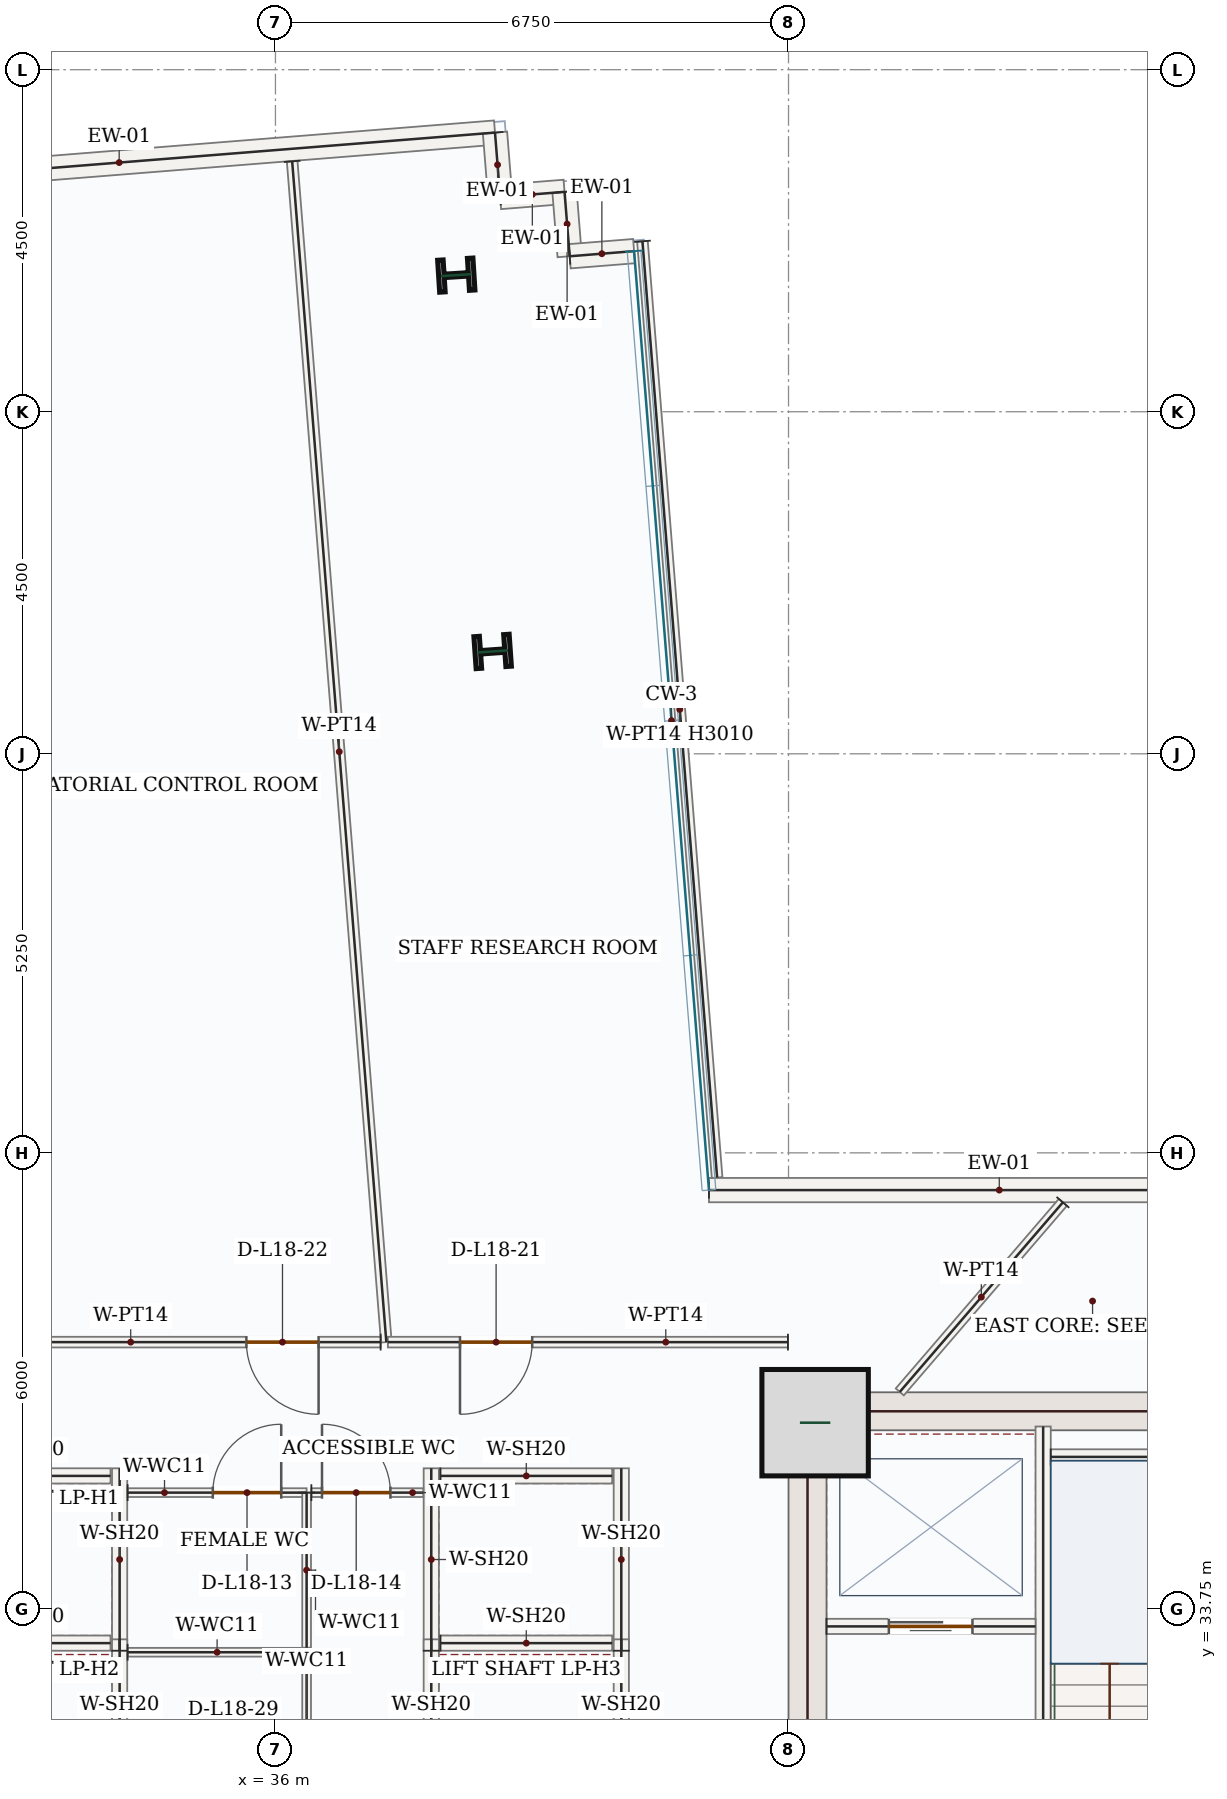
"""IFC4 building model, lengths in metres.
Left out: names, types, materials, properties, quantities, classifications, styles, units other than length and angle.
Written with IfcOpenShell. Run it as: python <this file> out.ifc"""

import sys

from ifc_helpers import new_model, si_unit, direction, frame, frame_2d, origin, origin_2d, place, context, subcontext, project, spatial, rectangle, i_section, extrude, source, transform, mapped, element, fill, save


model = new_model("IFC4")
c1 = context("Model", 3, precision=1e-05, world=origin(), true_north=direction((0.0, 1.0)))
c2 = subcontext(c1, "Body", "Model", "MODEL_VIEW")
j1 = project(units=[si_unit("LENGTHUNIT", "METRE"), si_unit("PLANEANGLEUNIT", "RADIAN")], contexts=[c1])
p1 = place(None, origin())
s1 = spatial("IfcSite", under=j1, at=p1, CompositionType="ELEMENT")
p2 = place(p1, origin())
s2 = spatial("IfcBuilding", under=s1, at=p2, CompositionType="ELEMENT")
p3 = place(p2, frame((0.0, 0.0, 83.7)))
s3 = spatial("IfcBuildingStorey", under=s2, at=p3, CompositionType="ELEMENT", Elevation=83.7)
p4 = place(p3, frame((43.0, 28.05, 0.0), z_axis=(0.0, 0.0, 1.0), x_axis=(0.0, 1.0, 0.0)))
e1 = element("IfcWall", 1, at=p4, inside=s3, PredefinedType="SHEAR", context=c2, shape_type="SweptSolid", body=[
    extrude(rectangle(XDim=8.55, YDim=0.5, at=frame_2d((4.275, 0.0))), origin(), (0.0, 0.0, 1.0), 3.95),
])
p5 = place(p4, frame((1.5, 0.0, 0.0)))
e2 = element("IfcOpeningElement", 2, at=p5, cuts=e1, PredefinedType="OPENING", context=c2, shape_type="SweptSolid", body=[
    extrude(rectangle(XDim=1.1, YDim=2.2, at=frame_2d((0.55, 1.1))), frame((0.0, 0.26, 0.0), z_axis=(0.0, -1.0, 0.0), x_axis=(1.0, 0.0, 0.0)), (0.0, 0.0, 1.0), 0.52),
])
m1 = source(origin(), c2, "Body", "SweptSolid", [
    extrude(rectangle(XDim=7.0, YDim=0.5, at=frame_2d((3.5, 0.0))), origin(), (0.0, 0.0, 1.0), 3.95),
])
p6 = place(p3, frame((43.25, 36.35, 0.0), z_axis=(0.0, 0.0, 1.0), x_axis=(1.0, 0.0, 0.0)))
e3 = element("IfcWall", 3, at=p6, inside=s3, PredefinedType="SHEAR", context=c2, shape_type="MappedRepresentation", body=[
    mapped(m1, transform((0.0, 0.0, 0.0), x_axis=(1.0, 0.0, 0.0), y_axis=(0.0, 1.0, 0.0), z_axis=(0.0, 0.0, 1.0), scale=1.0)),
])
m2 = source(origin(), c2, "Body", "SweptSolid", [
    extrude(rectangle(XDim=1.4, YDim=1.4, at=origin_2d()), origin(), (0.0, 0.0, 1.0), 4.2),
])
p7 = place(p3, frame((43.1, 36.2, 0.0), z_axis=(0.0, 0.0, 1.0), x_axis=(1.0, 0.0, 0.0)))
e4 = element("IfcColumn", 4, at=p7, inside=s3, PredefinedType="COLUMN", context=c2, shape_type="MappedRepresentation", body=[
    mapped(m2, transform((0.0, 0.0, 0.0), x_axis=(1.0, 0.0, 0.0), y_axis=(0.0, 1.0, 0.0), z_axis=(0.0, 0.0, 1.0), scale=1.0)),
])
m3 = source(origin(), c2, "Body", "SweptSolid", [
    extrude(i_section(OverallWidth=0.421, OverallDepth=0.465, WebThickness=0.045, FlangeThickness=0.073, FilletRadius=0.018, at=origin_2d()), origin(), (0.0, 0.0, 1.0), 4.2),
])
for number, where, z_axis, x_axis in (
    (5, (38.857, 46.346, 0.0), (0.0, 0.0, 1.0), (-0.07, 0.998, 0.0)),
    (6, (38.379, 51.297, 0.0), (0.0, 0.0, 1.0), (-0.063, 0.998, 0.0)),
):
    element("IfcColumn", number, at=place(p3, frame(where, z_axis=z_axis, x_axis=x_axis)), inside=s3, PredefinedType="COLUMN", context=c2, shape_type="MappedRepresentation", body=[
        mapped(m3, transform((0.0, 0.0, 0.0), x_axis=(1.0, 0.0, 0.0), y_axis=(0.0, 1.0, 0.0), z_axis=(0.0, 0.0, 1.0), scale=1.0)),
    ])
m4 = source(origin(), c2, "Body", "SweptSolid", [
    extrude(rectangle(XDim=9.92, YDim=0.32, at=frame_2d((4.96, 0.0))), origin(), (0.0, 0.0, 1.0), 3.95),
])
p8 = place(p3, frame((29.0, 52.384, 0.0), z_axis=(0.0, 0.0, 1.0), x_axis=(0.996833485558, 0.079517306731, 0.0)))
e7 = element("IfcWall", 7, at=p8, inside=s3, PredefinedType="SOLIDWALL", context=c2, shape_type="MappedRepresentation", body=[
    mapped(m4, transform((0.0, 0.0, 0.0), x_axis=(1.0, 0.0, 0.0), y_axis=(0.0, 1.0, 0.0), z_axis=(0.0, 0.0, 1.0), scale=1.0)),
])
m5 = source(origin(), c2, "Body", "SweptSolid", [
    extrude(rectangle(XDim=0.85, YDim=0.32, at=frame_2d((0.425, 0.0))), origin(), (0.0, 0.0, 1.0), 3.95),
])
p9 = place(p3, frame((38.888, 53.173, 0.0), z_axis=(0.0, 0.0, 1.0), x_axis=(0.079551174585, -0.996830783344, 0.0)))
e8 = element("IfcWall", 8, at=p9, inside=s3, PredefinedType="SOLIDWALL", context=c2, shape_type="MappedRepresentation", body=[
    mapped(m5, transform((0.0, 0.0, 0.0), x_axis=(1.0, 0.0, 0.0), y_axis=(0.0, 1.0, 0.0), z_axis=(0.0, 0.0, 1.0), scale=1.0)),
])
m6 = source(origin(), c2, "Body", "SweptSolid", [
    extrude(rectangle(XDim=0.85, YDim=0.32, at=frame_2d((0.425, 0.0))), origin(), (0.0, 0.0, 1.0), 3.95),
])
for number, where, z_axis, x_axis in (
    (9, (38.956, 52.325, 0.0), (0.0, 0.0, 1.0), (0.997, 0.079, 0.0)),
    (10, (39.803, 52.393, 0.0), (0.0, 0.0, 1.0), (0.08, -0.997, 0.0)),
):
    element("IfcWall", number, at=place(p3, frame(where, z_axis=z_axis, x_axis=x_axis)), inside=s3, PredefinedType="SOLIDWALL", context=c2, shape_type="MappedRepresentation", body=[
        mapped(m6, transform((0.0, 0.0, 0.0), x_axis=(1.0, 0.0, 0.0), y_axis=(0.0, 1.0, 0.0), z_axis=(0.0, 0.0, 1.0), scale=1.0)),
    ])
p10 = place(p3, frame((39.871, 51.545, 0.0), z_axis=(0.0, 0.0, 1.0), x_axis=(0.996830783344, 0.079551174585, 0.0)))
e11 = element("IfcWall", 11, at=p10, inside=s3, PredefinedType="SOLIDWALL", context=c2, shape_type="MappedRepresentation", body=[
    mapped(m5, transform((0.0, 0.0, 0.0), x_axis=(1.0, 0.0, 0.0), y_axis=(0.0, 1.0, 0.0), z_axis=(0.0, 0.0, 1.0), scale=1.0)),
])
m7 = source(origin(), c2, "Body", "SweptSolid", [
    extrude(rectangle(XDim=7.639, YDim=0.32, at=frame_2d((3.819, 0.0))), origin(), (0.0, 0.0, 1.0), 3.95),
])
p11 = place(p3, frame((41.703, 39.26, 0.0), z_axis=(0.0, 0.0, 1.0), x_axis=(1.0, 0.0, 0.0)))
e12 = element("IfcWall", 12, at=p11, inside=s3, PredefinedType="SOLIDWALL", context=c2, shape_type="MappedRepresentation", body=[
    mapped(m7, transform((0.0, 0.0, 0.0), x_axis=(1.0, 0.0, 0.0), y_axis=(0.0, 1.0, 0.0), z_axis=(0.0, 0.0, 1.0), scale=1.0)),
])
p12 = place(p3, frame((46.1, 28.15, 0.0), z_axis=(0.0, 0.0, 1.0), x_axis=(0.0, 1.0, 0.0)))
e13 = element("IfcWall", 13, at=p12, inside=s3, PredefinedType="SOLIDWALL", context=c2, shape_type="SweptSolid", body=[
    extrude(rectangle(XDim=8.0, YDim=0.2, at=frame_2d((4.0, 0.0))), origin(), (0.0, 0.0, 1.0), 3.95),
])
p13 = place(p12, frame((0.4, 0.0, 0.0)))
e14 = element("IfcOpeningElement", 14, at=p13, cuts=e13, PredefinedType="OPENING", context=c2, shape_type="SweptSolid", body=[
    extrude(rectangle(XDim=1.05, YDim=2.15, at=frame_2d((0.525, 1.075))), frame((0.0, 0.11, 0.0), z_axis=(0.0, -1.0, 0.0), x_axis=(1.0, 0.0, 0.0)), (0.0, 0.0, 1.0), 0.22),
])
m8 = source(origin(), c2, "Body", "SweptSolid", [
    extrude(rectangle(XDim=3.25, YDim=0.2, at=frame_2d((1.625, 0.0))), origin(), (0.0, 0.0, 1.0), 3.95),
])
p14 = place(p3, frame((46.2, 35.75, 0.0), z_axis=(0.0, 0.0, 1.0), x_axis=(1.0, 0.0, 0.0)))
e15 = element("IfcWall", 15, at=p14, inside=s3, PredefinedType="SOLIDWALL", context=c2, shape_type="MappedRepresentation", body=[
    mapped(m8, transform((0.0, 0.0, 0.0), x_axis=(1.0, 0.0, 0.0), y_axis=(0.0, 1.0, 0.0), z_axis=(0.0, 0.0, 1.0), scale=1.0)),
])
p15 = place(p3, frame((43.25, 33.52, 0.0), z_axis=(0.0, 0.0, 1.0), x_axis=(1.0, 0.0, 0.0)))
e16 = element("IfcWall", 16, at=p15, inside=s3, PredefinedType="SOLIDWALL", context=c2, shape_type="SweptSolid", body=[
    extrude(rectangle(XDim=2.75, YDim=0.2, at=frame_2d((1.375, 0.0))), origin(), (0.0, 0.0, 1.0), 3.95),
])
p16 = place(p15, frame((0.82, 0.0, 0.0)))
e17 = element("IfcOpeningElement", 17, at=p16, cuts=e16, PredefinedType="OPENING", context=c2, shape_type="SweptSolid", body=[
    extrude(rectangle(XDim=1.1, YDim=2.15, at=frame_2d((0.55, 1.075))), frame((0.0, 0.11, 0.0), z_axis=(0.0, -1.0, 0.0), x_axis=(1.0, 0.0, 0.0)), (0.0, 0.0, 1.0), 0.22),
])
m9 = source(origin(), c2, "Body", "SweptSolid", [
    extrude(rectangle(XDim=2.4, YDim=0.2, at=frame_2d((1.2, 0.0))), origin(), (0.0, 0.0, 1.0), 3.95),
])
p17 = place(p3, frame((33.95, 33.2, 0.0), z_axis=(0.0, 0.0, 1.0), x_axis=(0.0, 1.0, 0.0)))
e18 = element("IfcWall", 18, at=p17, inside=s3, PredefinedType="SOLIDWALL", context=c2, shape_type="MappedRepresentation", body=[
    mapped(m9, transform((0.0, 0.0, 0.0), x_axis=(1.0, 0.0, 0.0), y_axis=(0.0, 1.0, 0.0), z_axis=(0.0, 0.0, 1.0), scale=1.0)),
])
m10 = source(origin(), c2, "Body", "SweptSolid", [
    extrude(rectangle(XDim=2.26, YDim=0.2, at=frame_2d((1.13, 0.0))), origin(), (0.0, 0.0, 1.0), 3.95),
])
for number, where, z_axis, x_axis in (
    (19, (31.57, 33.3, 0.0), (0.0, 0.0, 1.0), (1.0, 0.0, 0.0)),
    (20, (31.57, 35.5, 0.0), (0.0, 0.0, 1.0), (1.0, 0.0, 0.0)),
):
    element("IfcWall", number, at=place(p3, frame(where, z_axis=z_axis, x_axis=x_axis)), inside=s3, PredefinedType="SOLIDWALL", context=c2, shape_type="MappedRepresentation", body=[
        mapped(m10, transform((0.0, 0.0, 0.0), x_axis=(1.0, 0.0, 0.0), y_axis=(0.0, 1.0, 0.0), z_axis=(0.0, 0.0, 1.0), scale=1.0)),
    ])
for number, where, z_axis, x_axis in (
    (21, (33.95, 30.95, 0.0), (0.0, 0.0, 1.0), (0.0, 1.0, 0.0)),
    (22, (38.05, 33.2, 0.0), (0.0, 0.0, 1.0), (0.0, 1.0, 0.0)),
    (23, (40.55, 33.2, 0.0), (0.0, 0.0, 1.0), (0.0, 1.0, 0.0)),
):
    element("IfcWall", number, at=place(p3, frame(where, z_axis=z_axis, x_axis=x_axis)), inside=s3, PredefinedType="SOLIDWALL", context=c2, shape_type="MappedRepresentation", body=[
        mapped(m9, transform((0.0, 0.0, 0.0), x_axis=(1.0, 0.0, 0.0), y_axis=(0.0, 1.0, 0.0), z_axis=(0.0, 0.0, 1.0), scale=1.0)),
    ])
for number, where, z_axis, x_axis in (
    (24, (38.17, 33.3, 0.0), (0.0, 0.0, 1.0), (1.0, 0.0, 0.0)),
    (25, (38.17, 35.5, 0.0), (0.0, 0.0, 1.0), (1.0, 0.0, 0.0)),
):
    element("IfcWall", number, at=place(p3, frame(where, z_axis=z_axis, x_axis=x_axis)), inside=s3, PredefinedType="SOLIDWALL", context=c2, shape_type="MappedRepresentation", body=[
        mapped(m10, transform((0.0, 0.0, 0.0), x_axis=(1.0, 0.0, 0.0), y_axis=(0.0, 1.0, 0.0), z_axis=(0.0, 0.0, 1.0), scale=1.0)),
    ])
for number, where, z_axis, x_axis in (
    (26, (38.05, 30.95, 0.0), (0.0, 0.0, 1.0), (0.0, 1.0, 0.0)),
    (27, (40.55, 30.95, 0.0), (0.0, 0.0, 1.0), (0.0, 1.0, 0.0)),
):
    element("IfcWall", number, at=place(p3, frame(where, z_axis=z_axis, x_axis=x_axis)), inside=s3, PredefinedType="SOLIDWALL", context=c2, shape_type="MappedRepresentation", body=[
        mapped(m9, transform((0.0, 0.0, 0.0), x_axis=(1.0, 0.0, 0.0), y_axis=(0.0, 1.0, 0.0), z_axis=(0.0, 0.0, 1.0), scale=1.0)),
    ])
m11 = source(origin(), c2, "Body", "SweptSolid", [
    extrude(rectangle(XDim=2.355, YDim=0.115, at=frame_2d((1.177, 0.0))), origin(), (0.0, 0.0, 1.0), 3.95),
])
p18 = place(p3, frame((34.055, 33.18, 0.0), z_axis=(0.0, 0.0, 1.0), x_axis=(1.0, 0.0, 0.0)))
e28 = element("IfcWall", 28, at=p18, inside=s3, PredefinedType="PARTITIONING", context=c2, shape_type="MappedRepresentation", body=[
    mapped(m11, transform((0.0, 0.0, 0.0), x_axis=(1.0, 0.0, 0.0), y_axis=(0.0, 1.0, 0.0), z_axis=(0.0, 0.0, 1.0), scale=1.0)),
])
m12 = source(origin(), c2, "Body", "SweptSolid", [
    extrude(rectangle(XDim=1.96, YDim=0.115, at=frame_2d((0.98, 0.0))), origin(), (0.0, 0.0, 1.0), 3.95),
])
p19 = place(p3, frame((36.41, 33.18, 0.0), z_axis=(0.0, 0.0, 1.0), x_axis=(0.0, -1.0, 0.0)))
e29 = element("IfcWall", 29, at=p19, inside=s3, PredefinedType="PARTITIONING", context=c2, shape_type="MappedRepresentation", body=[
    mapped(m12, transform((0.0, 0.0, 0.0), x_axis=(1.0, 0.0, 0.0), y_axis=(0.0, 1.0, 0.0), z_axis=(0.0, 0.0, 1.0), scale=1.0)),
])
p20 = place(p3, frame((34.055, 35.28, 0.0), z_axis=(0.0, 0.0, 1.0), x_axis=(1.0, 0.0, 0.0)))
e30 = element("IfcWall", 30, at=p20, inside=s3, PredefinedType="PARTITIONING", context=c2, shape_type="SweptSolid", body=[
    extrude(rectangle(XDim=2.355, YDim=0.115, at=frame_2d((1.177, 0.0))), origin(), (0.0, 0.0, 1.0), 3.95),
])
p21 = place(p20, frame((1.121, 0.0, 0.0)))
e31 = element("IfcOpeningElement", 31, at=p21, cuts=e30, PredefinedType="OPENING", context=c2, shape_type="SweptSolid", body=[
    extrude(rectangle(XDim=0.9, YDim=2.1, at=frame_2d((0.45, 1.05))), frame((0.0, 0.067, 0.0), z_axis=(0.0, -1.0, 0.0), x_axis=(1.0, 0.0, 0.0)), (0.0, 0.0, 1.0), 0.135),
])
m13 = source(origin(), c2, "Body", "SweptSolid", [
    extrude(rectangle(XDim=2.04, YDim=0.115, at=frame_2d((1.02, 0.0))), origin(), (0.0, 0.0, 1.0), 3.95),
])
p22 = place(p3, frame((36.41, 35.28, 0.0), z_axis=(0.0, 0.0, 1.0), x_axis=(0.0, -1.0, 0.0)))
e32 = element("IfcWall", 32, at=p22, inside=s3, PredefinedType="PARTITIONING", context=c2, shape_type="MappedRepresentation", body=[
    mapped(m13, transform((0.0, 0.0, 0.0), x_axis=(1.0, 0.0, 0.0), y_axis=(0.0, 1.0, 0.0), z_axis=(0.0, 0.0, 1.0), scale=1.0)),
])
p23 = place(p3, frame((36.472, 35.28, 0.0), z_axis=(0.0, 0.0, 1.0), x_axis=(1.0, 0.0, 0.0)))
e33 = element("IfcWall", 33, at=p23, inside=s3, PredefinedType="PARTITIONING", context=c2, shape_type="SweptSolid", body=[
    extrude(rectangle(XDim=1.473, YDim=0.115, at=frame_2d((0.736, 0.0))), origin(), (0.0, 0.0, 1.0), 3.95),
])
p24 = place(p23, frame((0.14, 0.0, 0.0)))
e34 = element("IfcOpeningElement", 34, at=p24, cuts=e33, PredefinedType="OPENING", context=c2, shape_type="SweptSolid", body=[
    extrude(rectangle(XDim=0.9, YDim=2.1, at=frame_2d((0.45, 1.05))), frame((0.0, 0.067, 0.0), z_axis=(0.0, -1.0, 0.0), x_axis=(1.0, 0.0, 0.0)), (0.0, 0.0, 1.0), 0.135),
])
m14 = source(origin(), c2, "Body", "SweptSolid", [
    extrude(rectangle(XDim=15.583, YDim=0.14, at=frame_2d((7.792, 0.0))), origin(), (0.0, 0.0, 1.0), 3.95),
])
p25 = place(p3, frame((36.22, 52.794, 0.0), z_axis=(0.0, 0.0, 1.0), x_axis=(0.079507979427, -0.996834229552, 0.0)))
e35 = element("IfcWall", 35, at=p25, inside=s3, PredefinedType="PARTITIONING", context=c2, shape_type="MappedRepresentation", body=[
    mapped(m14, transform((0.0, 0.0, 0.0), x_axis=(1.0, 0.0, 0.0), y_axis=(0.0, 1.0, 0.0), z_axis=(0.0, 0.0, 1.0), scale=1.0)),
])
p26 = place(p3, frame((37.384, 37.26, 0.0), z_axis=(0.0, 0.0, 1.0), x_axis=(-1.0, 0.0, 0.0)))
e36 = element("IfcWall", 36, at=p26, inside=s3, PredefinedType="PARTITIONING", context=c2, shape_type="SweptSolid", body=[
    extrude(rectangle(XDim=4.66, YDim=0.14, at=frame_2d((2.33, 0.0))), origin(), (0.0, 0.0, 1.0), 3.95),
])
p27 = place(p26, frame((0.816, 0.0, 0.0)))
e37 = element("IfcOpeningElement", 37, at=p27, cuts=e36, PredefinedType="OPENING", context=c2, shape_type="SweptSolid", body=[
    extrude(rectangle(XDim=0.95, YDim=2.15, at=frame_2d((0.475, 1.075))), frame((0.0, 0.08, 0.0), z_axis=(0.0, -1.0, 0.0), x_axis=(1.0, 0.0, 0.0)), (0.0, 0.0, 1.0), 0.16),
])
p28 = place(p3, frame((42.742, 37.26, 0.0), z_axis=(0.0, 0.0, 1.0), x_axis=(-0.999999998924, 4.6384341e-05, 0.0)))
e38 = element("IfcWall", 38, at=p28, inside=s3, PredefinedType="PARTITIONING", context=c2, shape_type="SweptSolid", body=[
    extrude(rectangle(XDim=5.263, YDim=0.14, at=frame_2d((2.632, 0.0))), origin(), (0.0, 0.0, 1.0), 3.95),
])
p29 = place(p28, frame((3.365, 0.0, 0.0)))
e39 = element("IfcOpeningElement", 39, at=p29, cuts=e38, PredefinedType="OPENING", context=c2, shape_type="SweptSolid", body=[
    extrude(rectangle(XDim=0.95, YDim=2.15, at=frame_2d((0.475, 1.075))), frame((0.0, 0.08, 0.0), z_axis=(0.0, -1.0, 0.0), x_axis=(1.0, 0.0, 0.0)), (0.0, 0.0, 1.0), 0.16),
])
m15 = source(origin(), c2, "Body", "SweptSolid", [
    extrude(rectangle(XDim=12.356, YDim=0.14, at=frame_2d((6.178, 0.0))), origin(), (0.0, 0.0, 1.0), 3.01),
])
p30 = place(p3, frame((40.828, 51.742, 0.0), z_axis=(0.0, 0.0, 1.0), x_axis=(0.079527689156, -0.996832657299, 0.0)))
e40 = element("IfcWall", 40, at=p30, inside=s3, PredefinedType="PARTITIONING", context=c2, shape_type="MappedRepresentation", body=[
    mapped(m15, transform((0.0, 0.0, 0.0), x_axis=(1.0, 0.0, 0.0), y_axis=(0.0, 1.0, 0.0), z_axis=(0.0, 0.0, 1.0), scale=1.0)),
])
m16 = source(origin(), c2, "Body", "SweptSolid", [
    extrude(rectangle(XDim=3.29, YDim=0.14, at=frame_2d((1.645, 0.0))), origin(), (0.0, 0.0, 1.0), 3.95),
])
p31 = place(p3, frame((46.36, 39.099, 0.0), z_axis=(0.0, 0.0, 1.0), x_axis=(-0.652214149627, -0.758034763732, 0.0)))
e41 = element("IfcWall", 41, at=p31, inside=s3, PredefinedType="PARTITIONING", context=c2, shape_type="MappedRepresentation", body=[
    mapped(m16, transform((0.0, 0.0, 0.0), x_axis=(1.0, 0.0, 0.0), y_axis=(0.0, 1.0, 0.0), z_axis=(0.0, 0.0, 1.0), scale=1.0)),
])
m17 = source(origin(), c2, "Body", "SweptSolid", [
    extrude(rectangle(XDim=1.1, YDim=2.15, at=frame_2d((0.55, 1.075))), frame((0.0, 0.025, 0.0), z_axis=(0.0, -1.0, 0.0), x_axis=(1.0, 0.0, 0.0)), (0.0, 0.0, 1.0), 0.05),
])
p32 = place(p16, origin())
e42 = element("IfcDoor", 42, at=p32, inside=s3, OperationType="DOUBLE_DOOR_SLIDING", PredefinedType="DOOR", context=c2, shape_type="MappedRepresentation", body=[
    mapped(m17, transform((0.0, 0.0, 0.0), x_axis=(1.0, 0.0, 0.0), y_axis=(0.0, 1.0, 0.0), z_axis=(0.0, 0.0, 1.0), scale=1.0)),
])
fill(e17, e42)
m18 = source(origin(), c2, "Body", "SweptSolid", [
    extrude(rectangle(XDim=0.9, YDim=2.1, at=frame_2d((0.45, 1.05))), frame((0.0, 0.025, 0.0), z_axis=(0.0, -1.0, 0.0), x_axis=(1.0, 0.0, 0.0)), (0.0, 0.0, 1.0), 0.05),
])
p33 = place(p21, origin())
e43 = element("IfcDoor", 43, at=p33, inside=s3, OperationType="SINGLE_SWING_RIGHT", PredefinedType="DOOR", context=c2, shape_type="MappedRepresentation", body=[
    mapped(m18, transform((0.0, 0.0, 0.0), x_axis=(1.0, 0.0, 0.0), y_axis=(0.0, 1.0, 0.0), z_axis=(0.0, 0.0, 1.0), scale=1.0)),
])
fill(e31, e43)
p34 = place(p24, origin())
e44 = element("IfcDoor", 44, at=p34, inside=s3, OperationType="SINGLE_SWING_LEFT", PredefinedType="DOOR", context=c2, shape_type="MappedRepresentation", body=[
    mapped(m18, transform((0.0, 0.0, 0.0), x_axis=(1.0, 0.0, 0.0), y_axis=(0.0, 1.0, 0.0), z_axis=(0.0, 0.0, 1.0), scale=1.0)),
])
fill(e34, e44)
m19 = source(origin(), c2, "Body", "SweptSolid", [
    extrude(rectangle(XDim=0.95, YDim=2.15, at=frame_2d((0.475, 1.075))), frame((0.0, 0.025, 0.0), z_axis=(0.0, -1.0, 0.0), x_axis=(1.0, 0.0, 0.0)), (0.0, 0.0, 1.0), 0.05),
])
p35 = place(p29, origin())
e45 = element("IfcDoor", 45, at=p35, inside=s3, OperationType="SINGLE_SWING_RIGHT", PredefinedType="DOOR", context=c2, shape_type="MappedRepresentation", body=[
    mapped(m19, transform((0.0, 0.0, 0.0), x_axis=(1.0, 0.0, 0.0), y_axis=(0.0, 1.0, 0.0), z_axis=(0.0, 0.0, 1.0), scale=1.0)),
])
fill(e39, e45)
p36 = place(p27, origin())
e46 = element("IfcDoor", 46, at=p36, inside=s3, OperationType="SINGLE_SWING_LEFT", PredefinedType="DOOR", context=c2, shape_type="MappedRepresentation", body=[
    mapped(m19, transform((0.0, 0.0, 0.0), x_axis=(1.0, 0.0, 0.0), y_axis=(0.0, 1.0, 0.0), z_axis=(0.0, 0.0, 1.0), scale=1.0)),
])
fill(e37, e46)
save(model, sys.argv[1])
